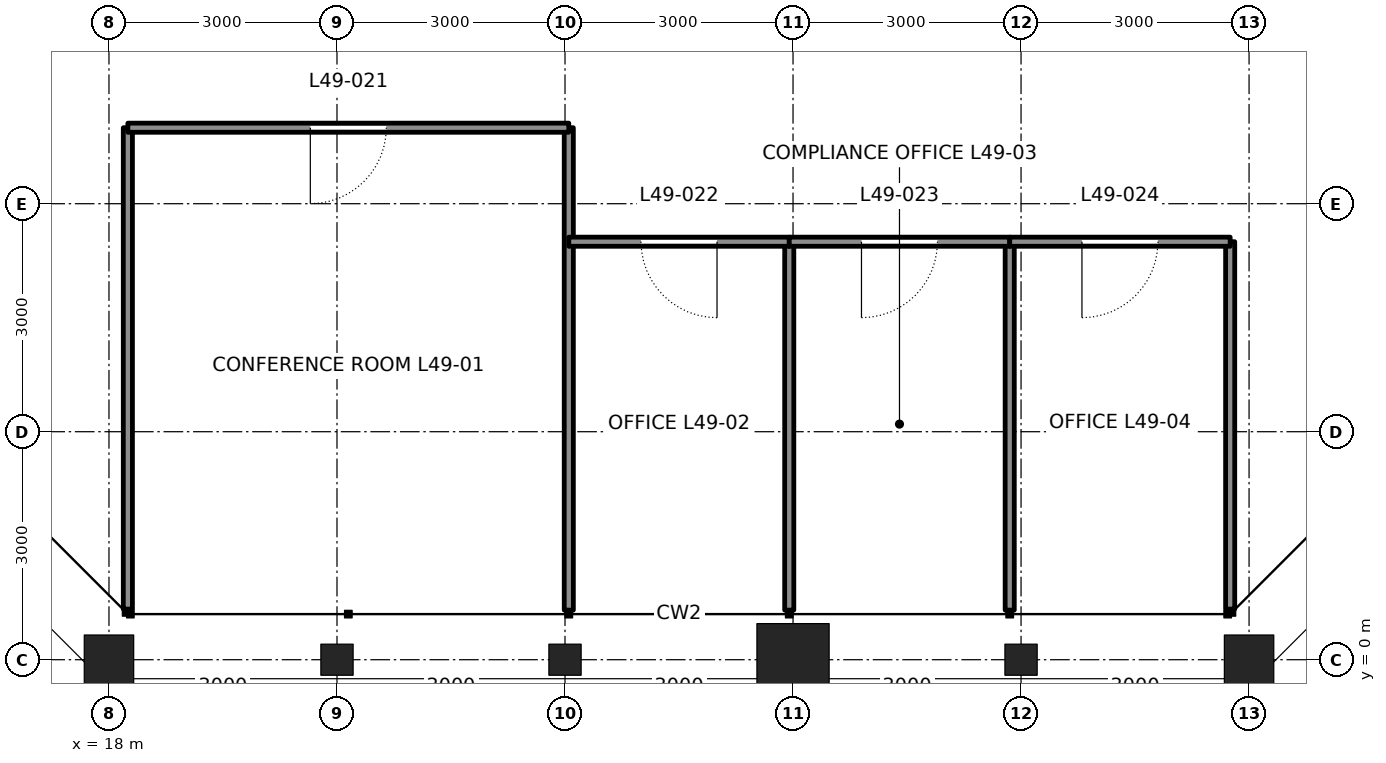
"""IFC4 building model, lengths in metres.
Left out: names, types, materials, properties, quantities, classifications, styles, units other than length and angle.
Written with IfcOpenShell. Run it as: python <this file> out.ifc"""

import sys

from ifc_helpers import new_model, si_unit, direction, frame, frame_2d, origin, origin_2d, place, context, subcontext, project, spatial, rectangle, hollow_rectangle, i_section, extrude, element, fill, save


model = new_model("IFC4")
c1 = context("Model", 3, precision=1e-05, world=origin(), true_north=direction((0.0, 1.0)))
c2 = subcontext(c1, "Body", "Model", "MODEL_VIEW")
j1 = project(units=[si_unit("LENGTHUNIT", "METRE"), si_unit("PLANEANGLEUNIT", "RADIAN")], contexts=[c1])
p1 = place(None, origin())
s1 = spatial("IfcSite", under=j1, at=p1, CompositionType="ELEMENT")
p2 = place(p1, origin())
s2 = spatial("IfcBuilding", under=s1, at=p2, CompositionType="ELEMENT")
p3 = place(p2, frame((0.0, 0.0, 222.3)))
s3 = spatial("IfcBuildingStorey", under=s2, at=p3, CompositionType="ELEMENT", Elevation=222.3)
p4 = place(p3, frame((18.0, 0.0, 0.0), z_axis=(0.0, 0.0, 1.0), x_axis=(0.0, -1.0, 0.0)))
e1 = element("IfcColumn", 1, at=p4, inside=s3, PredefinedType="COLUMN", context=c2, shape_type="SweptSolid", body=[
    extrude(hollow_rectangle(XDim=0.65, YDim=0.65, WallThickness=0.065, at=origin_2d()), origin(), (0.0, 0.0, 1.0), 4.2),
])
for number, where, z_axis, x_axis in (
    (2, (21.0, 0.0, 0.0), (0.0, 0.0, 1.0), (0.0, -1.0, 0.0)),
    (3, (24.0, 0.0, 0.0), (0.0, 0.0, 1.0), (0.0, -1.0, 0.0)),
):
    element("IfcColumn", number, at=place(p3, frame(where, z_axis=z_axis, x_axis=x_axis)), inside=s3, PredefinedType="COLUMN", context=c2, shape_type="SweptSolid", body=[
        extrude(i_section(OverallWidth=0.409, OverallDepth=0.424, WebThickness=0.033, FlangeThickness=0.052, at=origin_2d()), origin(), (0.0, 0.0, 1.0), 4.2),
    ])
p5 = place(p3, frame((27.0, 0.0, 0.0), z_axis=(0.0, 0.0, 1.0), x_axis=(0.0, -1.0, 0.0)))
e4 = element("IfcColumn", 4, at=p5, inside=s3, PredefinedType="COLUMN", context=c2, shape_type="SweptSolid", body=[
    extrude(hollow_rectangle(XDim=0.95, YDim=0.95, WallThickness=0.11, at=origin_2d()), origin(), (0.0, 0.0, 1.0), 4.2),
])
p6 = place(p3, frame((30.0, 0.0, 0.0), z_axis=(0.0, 0.0, 1.0), x_axis=(0.0, -1.0, 0.0)))
e5 = element("IfcColumn", 5, at=p6, inside=s3, PredefinedType="COLUMN", context=c2, shape_type="SweptSolid", body=[
    extrude(i_section(OverallWidth=0.409, OverallDepth=0.424, WebThickness=0.033, FlangeThickness=0.052, at=origin_2d()), origin(), (0.0, 0.0, 1.0), 4.2),
])
p7 = place(p3, frame((33.0, 0.0, 0.0), z_axis=(0.0, 0.0, 1.0), x_axis=(0.0, -1.0, 0.0)))
e6 = element("IfcColumn", 6, at=p7, inside=s3, PredefinedType="COLUMN", context=c2, shape_type="SweptSolid", body=[
    extrude(hollow_rectangle(XDim=0.65, YDim=0.65, WallThickness=0.065, at=origin_2d()), origin(), (0.0, 0.0, 1.0), 4.2),
])
p8 = place(p3, frame((18.249, 0.666, 0.0), z_axis=(0.0, 0.0, 1.0), x_axis=(0.0, 1.0, 0.0)))
e7 = element("IfcWall", 7, at=p8, inside=s3, PredefinedType="PARTITIONING", context=c2, shape_type="SweptSolid", body=[
    extrude(rectangle(XDim=6.334, YDim=0.12, at=frame_2d((3.167, 0.0))), origin(), (0.0, 0.0, 1.0), 4.04),
])
p9 = place(p3, frame((24.05, 0.653, 0.0), z_axis=(0.0, 0.0, 1.0), x_axis=(0.0, 1.0, 0.0)))
e8 = element("IfcWall", 8, at=p9, inside=s3, PredefinedType="PARTITIONING", context=c2, shape_type="SweptSolid", body=[
    extrude(rectangle(XDim=6.347, YDim=0.12, at=frame_2d((3.174, 0.0))), origin(), (0.0, 0.0, 1.0), 3.357),
])
p10 = place(p3, frame((26.95, 0.653, 0.0), z_axis=(0.0, 0.0, 1.0), x_axis=(0.0, 1.0, 0.0)))
e9 = element("IfcWall", 9, at=p10, inside=s3, PredefinedType="PARTITIONING", context=c2, shape_type="SweptSolid", body=[
    extrude(rectangle(XDim=4.847, YDim=0.12, at=frame_2d((2.424, 0.0))), origin(), (0.0, 0.0, 1.0), 3.357),
])
p11 = place(p3, frame((29.851, 0.653, 0.0), z_axis=(0.0, 0.0, 1.0), x_axis=(0.0, 1.0, 0.0)))
e10 = element("IfcWall", 10, at=p11, inside=s3, PredefinedType="PARTITIONING", context=c2, shape_type="SweptSolid", body=[
    extrude(rectangle(XDim=4.847, YDim=0.12, at=frame_2d((2.424, 0.0))), origin(), (0.0, 0.0, 1.0), 4.04),
])
p12 = place(p3, frame((32.751, 0.666, 0.0), z_axis=(0.0, 0.0, 1.0), x_axis=(0.0, 1.0, 0.0)))
e11 = element("IfcWall", 11, at=p12, inside=s3, PredefinedType="PARTITIONING", context=c2, shape_type="SweptSolid", body=[
    extrude(rectangle(XDim=4.834, YDim=0.12, at=frame_2d((2.417, 0.0))), origin(), (0.0, 0.0, 1.0), 4.04),
])
p13 = place(p3, frame((18.249, 7.0, 0.0), z_axis=(0.0, 0.0, 1.0), x_axis=(1.0, 0.0, 0.0)))
e12 = element("IfcWall", 12, at=p13, inside=s3, PredefinedType="PARTITIONING", context=c2, shape_type="SweptSolid", body=[
    extrude(rectangle(XDim=5.801, YDim=0.12, at=frame_2d((2.901, 0.0))), origin(), (0.0, 0.0, 1.0), 4.04),
])
p14 = place(p13, frame((2.401, 0.0, 0.0)))
e13 = element("IfcOpeningElement", 13, at=p14, cuts=e12, PredefinedType="OPENING", context=c2, shape_type="SweptSolid", body=[
    extrude(rectangle(XDim=1.0, YDim=2.4, at=frame_2d((0.5, 1.2))), frame((0.0, 0.07, 0.0), z_axis=(0.0, -1.0, 0.0), x_axis=(1.0, 0.0, 0.0)), (0.0, 0.0, 1.0), 0.14),
])
p15 = place(p3, frame((24.05, 5.5, 0.0), z_axis=(0.0, 0.0, 1.0), x_axis=(1.0, 0.0, 0.0)))
e14 = element("IfcWall", 14, at=p15, inside=s3, PredefinedType="PARTITIONING", context=c2, shape_type="SweptSolid", body=[
    extrude(rectangle(XDim=2.9, YDim=0.12, at=frame_2d((1.45, 0.0))), origin(), (0.0, 0.0, 1.0), 4.04),
])
p16 = place(p15, frame((0.95, 0.0, 0.0)))
e15 = element("IfcOpeningElement", 15, at=p16, cuts=e14, PredefinedType="OPENING", context=c2, shape_type="SweptSolid", body=[
    extrude(rectangle(XDim=1.0, YDim=2.4, at=frame_2d((0.5, 1.2))), frame((0.0, 0.07, 0.0), z_axis=(0.0, -1.0, 0.0), x_axis=(1.0, 0.0, 0.0)), (0.0, 0.0, 1.0), 0.14),
])
p17 = place(p3, frame((26.95, 5.5, 0.0), z_axis=(0.0, 0.0, 1.0), x_axis=(1.0, 0.0, 0.0)))
e16 = element("IfcWall", 16, at=p17, inside=s3, PredefinedType="PARTITIONING", context=c2, shape_type="SweptSolid", body=[
    extrude(rectangle(XDim=2.901, YDim=0.12, at=frame_2d((1.45, 0.0))), origin(), (0.0, 0.0, 1.0), 4.04),
])
p18 = place(p17, frame((0.95, 0.0, 0.0)))
e17 = element("IfcOpeningElement", 17, at=p18, cuts=e16, PredefinedType="OPENING", context=c2, shape_type="SweptSolid", body=[
    extrude(rectangle(XDim=1.0, YDim=2.4, at=frame_2d((0.5, 1.2))), frame((0.0, 0.07, 0.0), z_axis=(0.0, -1.0, 0.0), x_axis=(1.0, 0.0, 0.0)), (0.0, 0.0, 1.0), 0.14),
])
p19 = place(p3, frame((29.851, 5.5, 0.0), z_axis=(0.0, 0.0, 1.0), x_axis=(1.0, 0.0, 0.0)))
e18 = element("IfcWall", 18, at=p19, inside=s3, PredefinedType="PARTITIONING", context=c2, shape_type="SweptSolid", body=[
    extrude(rectangle(XDim=2.901, YDim=0.12, at=frame_2d((1.45, 0.0))), origin(), (0.0, 0.0, 1.0), 4.04),
])
p20 = place(p19, frame((0.95, 0.0, 0.0)))
e19 = element("IfcOpeningElement", 19, at=p20, cuts=e18, PredefinedType="OPENING", context=c2, shape_type="SweptSolid", body=[
    extrude(rectangle(XDim=1.0, YDim=2.4, at=frame_2d((0.5, 1.2))), frame((0.0, 0.07, 0.0), z_axis=(0.0, -1.0, 0.0), x_axis=(1.0, 0.0, 0.0)), (0.0, 0.0, 1.0), 0.14),
])
p21 = place(p14, frame((1.0, 0.0, 0.0), z_axis=(0.0, 0.0, 1.0), x_axis=(-1.0, 0.0, 0.0)))
e20 = element("IfcDoor", 20, at=p21, inside=s3, OperationType="SINGLE_SWING_RIGHT", PredefinedType="DOOR", context=c2, shape_type="SweptSolid", body=[
    extrude(rectangle(XDim=1.0, YDim=2.4, at=frame_2d((0.5, 1.2))), frame((0.0, 0.025, 0.0), z_axis=(0.0, -1.0, 0.0), x_axis=(1.0, 0.0, 0.0)), (0.0, 0.0, 1.0), 0.05),
])
fill(e13, e20)
p22 = place(p16, frame((1.0, 0.0, 0.0), z_axis=(0.0, 0.0, 1.0), x_axis=(-1.0, 0.0, 0.0)))
e21 = element("IfcDoor", 21, at=p22, inside=s3, OperationType="SINGLE_SWING_LEFT", PredefinedType="DOOR", context=c2, shape_type="SweptSolid", body=[
    extrude(rectangle(XDim=1.0, YDim=2.4, at=frame_2d((0.5, 1.2))), frame((0.0, 0.025, 0.0), z_axis=(0.0, -1.0, 0.0), x_axis=(1.0, 0.0, 0.0)), (0.0, 0.0, 1.0), 0.05),
])
fill(e15, e21)
p23 = place(p18, frame((1.0, 0.0, 0.0), z_axis=(0.0, 0.0, 1.0), x_axis=(-1.0, 0.0, 0.0)))
e22 = element("IfcDoor", 22, at=p23, inside=s3, OperationType="SINGLE_SWING_RIGHT", PredefinedType="DOOR", context=c2, shape_type="SweptSolid", body=[
    extrude(rectangle(XDim=1.0, YDim=2.4, at=frame_2d((0.5, 1.2))), frame((0.0, 0.025, 0.0), z_axis=(0.0, -1.0, 0.0), x_axis=(1.0, 0.0, 0.0)), (0.0, 0.0, 1.0), 0.05),
])
fill(e17, e22)
p24 = place(p20, frame((1.0, 0.0, 0.0), z_axis=(0.0, 0.0, 1.0), x_axis=(-1.0, 0.0, 0.0)))
e23 = element("IfcDoor", 23, at=p24, inside=s3, OperationType="SINGLE_SWING_RIGHT", PredefinedType="DOOR", context=c2, shape_type="SweptSolid", body=[
    extrude(rectangle(XDim=1.0, YDim=2.4, at=frame_2d((0.5, 1.2))), frame((0.0, 0.025, 0.0), z_axis=(0.0, -1.0, 0.0), x_axis=(1.0, 0.0, 0.0)), (0.0, 0.0, 1.0), 0.05),
])
fill(e19, e23)
save(model, sys.argv[1])
